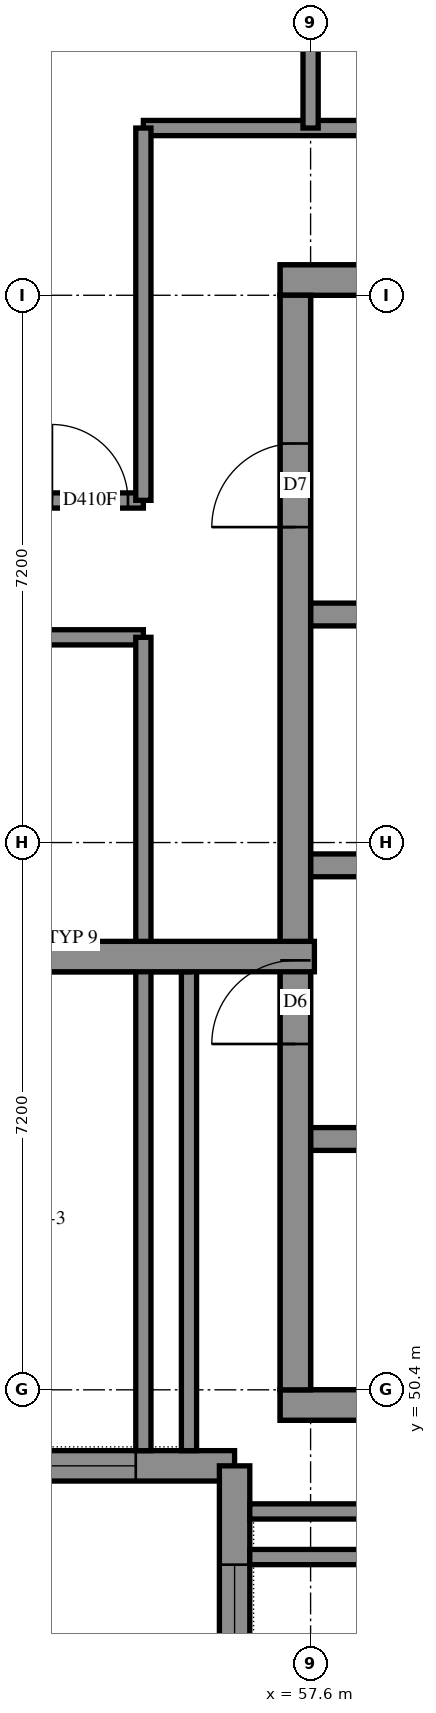
"""IFC4 building model, lengths in metres.
Left out: names, types, materials, properties, quantities, classifications, styles, units other than length and angle.
Written with IfcOpenShell. Run it as: python <this file> out.ifc"""

import sys

from ifc_helpers import new_model, si_unit, direction, frame, frame_2d, origin, place, context, subcontext, project, spatial, polyline, rectangle, outline, extrude, element, fill, save


model = new_model("IFC4")
c1 = context("Model", 3, precision=1e-05, world=origin(), true_north=direction((0.0, 1.0)))
c2 = subcontext(c1, "Body", "Model", "MODEL_VIEW")
j1 = project(units=[si_unit("LENGTHUNIT", "METRE"), si_unit("PLANEANGLEUNIT", "RADIAN")], contexts=[c1])
p1 = place(None, origin())
s1 = spatial("IfcSite", under=j1, at=p1, CompositionType="ELEMENT")
p2 = place(p1, origin())
s2 = spatial("IfcBuilding", under=s1, at=p2, CompositionType="ELEMENT")
p3 = place(p2, frame((0.0, 0.0, 290.6)))
s3 = spatial("IfcBuildingStorey", under=s2, at=p3, CompositionType="ELEMENT", Elevation=290.6)
p4 = place(p3, frame((57.2, 50.2, -0.3), z_axis=(0.0, 0.0, 1.0), x_axis=(1.0, 0.0, 0.0)))
e1 = element("IfcWall", 1, at=p4, inside=s3, PredefinedType="SHEAR", context=c2, shape_type="SweptSolid", body=[
    extrude(rectangle(XDim=15.2, YDim=0.4, at=frame_2d((7.6, 0.0))), origin(), (0.0, 0.0, 1.0), 3.1),
])
p5 = place(p3, frame((57.2, 65.0, -0.3), z_axis=(0.0, 0.0, 1.0), x_axis=(1.0, 0.0, 0.0)))
e2 = element("IfcWall", 2, at=p5, inside=s3, PredefinedType="SHEAR", context=c2, shape_type="SweptSolid", body=[
    extrude(rectangle(XDim=15.2, YDim=0.4, at=frame_2d((7.6, 0.0))), origin(), (0.0, 0.0, 1.0), 3.1),
])
p6 = place(p5, frame((10.4, 0.0, 0.3)))
e3 = element("IfcOpeningElement", 3, at=p6, cuts=e2, PredefinedType="OPENING", context=c2, shape_type="SweptSolid", body=[
    extrude(rectangle(XDim=0.8, YDim=2.1, at=frame_2d((0.4, 1.05))), frame((0.0, 0.21, 0.0), z_axis=(0.0, -1.0, 0.0), x_axis=(1.0, 0.0, 0.0)), (0.0, 0.0, 1.0), 0.42),
])
p7 = place(p3, frame((57.4, 50.4, -0.3), z_axis=(0.0, 0.0, 1.0), x_axis=(0.0, 1.0, 0.0)))
e4 = element("IfcWall", 4, at=p7, inside=s3, PredefinedType="SHEAR", context=c2, shape_type="SweptSolid", body=[
    extrude(rectangle(XDim=14.4, YDim=0.4, at=frame_2d((7.2, 0.0))), origin(), (0.0, 0.0, 1.0), 3.1),
])
p8 = place(p7, frame((4.55, 0.0, 0.3)))
e5 = element("IfcOpeningElement", 5, at=p8, cuts=e4, PredefinedType="OPENING", context=c2, shape_type="SweptSolid", body=[
    extrude(rectangle(XDim=1.1, YDim=2.1, at=frame_2d((0.55, 1.05))), frame((0.0, 0.21, 0.0), z_axis=(0.0, -1.0, 0.0), x_axis=(1.0, 0.0, 0.0)), (0.0, 0.0, 1.0), 0.42),
])
p9 = place(p7, frame((11.35, 0.0, 0.3)))
e6 = element("IfcOpeningElement", 6, at=p9, cuts=e4, PredefinedType="OPENING", context=c2, shape_type="SweptSolid", body=[
    extrude(rectangle(XDim=1.1, YDim=2.1, at=frame_2d((0.55, 1.05))), frame((0.0, 0.21, 0.0), z_axis=(0.0, -1.0, 0.0), x_axis=(1.0, 0.0, 0.0)), (0.0, 0.0, 1.0), 0.42),
])
p10 = place(p3, frame((57.6, 53.7, 0.0), z_axis=(0.0, 0.0, 1.0), x_axis=(1.0, 0.0, 0.0)))
e7 = element("IfcWall", 7, at=p10, inside=s3, PredefinedType="SOLIDWALL", context=c2, shape_type="SweptSolid", body=[
    extrude(rectangle(XDim=14.4, YDim=0.3, at=frame_2d((7.2, 0.0))), origin(), (0.0, 0.0, 1.0), 3.5),
])
p11 = place(p10, frame((12.05, 0.0, 0.0)))
e8 = element("IfcOpeningElement", 8, at=p11, cuts=e7, PredefinedType="OPENING", context=c2, shape_type="SweptSolid", body=[
    extrude(rectangle(XDim=1.1, YDim=2.1, at=frame_2d((0.55, 1.05))), frame((0.0, 0.16, 0.0), z_axis=(0.0, -1.0, 0.0), x_axis=(1.0, 0.0, 0.0)), (0.0, 0.0, 1.0), 0.32),
])
p12 = place(p3, frame((57.6, 57.3, 0.0), z_axis=(0.0, 0.0, 1.0), x_axis=(1.0, 0.0, 0.0)))
e9 = element("IfcWall", 9, at=p12, inside=s3, PredefinedType="SOLIDWALL", context=c2, shape_type="SweptSolid", body=[
    extrude(rectangle(XDim=14.4, YDim=0.3, at=frame_2d((7.2, 0.0))), origin(), (0.0, 0.0, 1.0), 3.5),
])
p13 = place(p12, frame((12.05, 0.0, 0.0)))
e10 = element("IfcOpeningElement", 10, at=p13, cuts=e9, PredefinedType="OPENING", context=c2, shape_type="SweptSolid", body=[
    extrude(rectangle(XDim=1.1, YDim=2.1, at=frame_2d((0.55, 1.05))), frame((0.0, 0.16, 0.0), z_axis=(0.0, -1.0, 0.0), x_axis=(1.0, 0.0, 0.0)), (0.0, 0.0, 1.0), 0.32),
])
p14 = place(p3, frame((57.6, 60.6, 0.0), z_axis=(0.0, 0.0, 1.0), x_axis=(1.0, 0.0, 0.0)))
e11 = element("IfcWall", 11, at=p14, inside=s3, PredefinedType="SOLIDWALL", context=c2, shape_type="SweptSolid", body=[
    extrude(rectangle(XDim=7.2, YDim=0.3, at=frame_2d((3.6, 0.0))), origin(), (0.0, 0.0, 1.0), 3.5),
])
p15 = place(p3, frame((49.4, 49.4, 0.0), z_axis=(0.0, 0.0, 1.0), x_axis=(1.0, 0.0, 0.0)))
e12 = element("IfcWall", 12, at=p15, inside=s3, PredefinedType="SOLIDWALL", context=c2, shape_type="SweptSolid", body=[
    extrude(outline(polyline([(-0.2, -0.2), (7.0, -0.2), (7.4, 0.2), (0.2, 0.2), (-0.2, -0.2)])), origin(), (0.0, 0.0, 1.0), 3.5),
])
p16 = place(p15, frame((1.9, 0.0, 0.7)))
e13 = element("IfcOpeningElement", 13, at=p16, cuts=e12, PredefinedType="OPENING", context=c2, shape_type="SweptSolid", body=[
    extrude(rectangle(XDim=1.8, YDim=2.2, at=frame_2d((0.9, 1.1))), frame((0.0, 0.21, 0.0), z_axis=(0.0, -1.0, 0.0), x_axis=(1.0, 0.0, 0.0)), (0.0, 0.0, 1.0), 0.42),
])
p17 = place(p15, frame((4.1, 0.0, 0.7)))
e14 = element("IfcOpeningElement", 14, at=p17, cuts=e12, PredefinedType="OPENING", context=c2, shape_type="SweptSolid", body=[
    extrude(rectangle(XDim=1.8, YDim=2.2, at=frame_2d((0.9, 1.1))), frame((0.0, 0.21, 0.0), z_axis=(0.0, -1.0, 0.0), x_axis=(1.0, 0.0, 0.0)), (0.0, 0.0, 1.0), 0.42),
])
p18 = place(p3, frame((56.6, 49.4, 0.0), z_axis=(0.0, 0.0, 1.0), x_axis=(0.0, -1.0, 0.0)))
e15 = element("IfcWall", 15, at=p18, inside=s3, PredefinedType="SOLIDWALL", context=c2, shape_type="SweptSolid", body=[
    extrude(outline(polyline([(0.2, -0.2), (8.633, -0.2), (8.075, 0.2), (-0.2, 0.2), (0.2, -0.2)])), origin(), (0.0, 0.0, 1.0), 3.5),
])
p19 = place(p18, frame((1.3, 0.0, 0.7)))
e16 = element("IfcOpeningElement", 16, at=p19, cuts=e15, PredefinedType="OPENING", context=c2, shape_type="SweptSolid", body=[
    extrude(rectangle(XDim=1.8, YDim=2.2, at=frame_2d((0.9, 1.1))), frame((0.0, 0.21, 0.0), z_axis=(0.0, -1.0, 0.0), x_axis=(1.0, 0.0, 0.0)), (0.0, 0.0, 1.0), 0.42),
])
p20 = place(p18, frame((3.9, 0.0, 0.7)))
e17 = element("IfcOpeningElement", 17, at=p20, cuts=e15, PredefinedType="OPENING", context=c2, shape_type="SweptSolid", body=[
    extrude(rectangle(XDim=1.8, YDim=2.2, at=frame_2d((0.9, 1.1))), frame((0.0, 0.21, 0.0), z_axis=(0.0, -1.0, 0.0), x_axis=(1.0, 0.0, 0.0)), (0.0, 0.0, 1.0), 0.42),
])
p21 = place(p3, frame((56.0, 49.6, 0.0), z_axis=(0.0, 0.0, 1.0), x_axis=(0.0, 1.0, 0.0)))
e18 = element("IfcWall", 18, at=p21, inside=s3, PredefinedType="PARAPET", context=c2, shape_type="SweptSolid", body=[
    extrude(outline(polyline([(0.0, -0.1), (6.5, -0.1), (6.3, 0.1), (0.0, 0.1), (0.0, -0.1)])), origin(), (0.0, 0.0, 1.0), 0.25),
])
p22 = place(p3, frame((56.0, 56.0, 0.0), z_axis=(0.0, 0.0, 1.0), x_axis=(-1.0, 0.0, 0.0)))
e19 = element("IfcWall", 19, at=p22, inside=s3, PredefinedType="PARAPET", context=c2, shape_type="SweptSolid", body=[
    extrude(outline(polyline([(-0.1, -0.1), (6.4, -0.1), (6.4, 0.1), (0.1, 0.1), (-0.1, -0.1)])), origin(), (0.0, 0.0, 1.0), 0.25),
])
p23 = place(p3, frame((55.4, 67.0, 0.0), z_axis=(0.0, 0.0, 1.0), x_axis=(1.0, 0.0, 0.0)))
e20 = element("IfcWall", 20, at=p23, inside=s3, PredefinedType="PARTITIONING", context=c2, shape_type="SweptSolid", body=[
    extrude(rectangle(XDim=18.8, YDim=0.2, at=frame_2d((9.4, 0.0))), origin(), (0.0, 0.0, 1.0), 3.5),
])
p24 = place(p23, frame((4.293, 0.0, 0.0)))
e21 = element("IfcOpeningElement", 21, at=p24, cuts=e20, PredefinedType="OPENING", context=c2, shape_type="SweptSolid", body=[
    extrude(rectangle(XDim=1.0, YDim=2.1, at=frame_2d((0.5, 1.05))), frame((0.0, 0.11, 0.0), z_axis=(0.0, -1.0, 0.0), x_axis=(1.0, 0.0, 0.0)), (0.0, 0.0, 1.0), 0.22),
])
p25 = place(p23, frame((6.367, 0.0, 0.0)))
e22 = element("IfcOpeningElement", 22, at=p25, cuts=e20, PredefinedType="OPENING", context=c2, shape_type="SweptSolid", body=[
    extrude(rectangle(XDim=1.0, YDim=2.1, at=frame_2d((0.5, 1.05))), frame((0.0, 0.11, 0.0), z_axis=(0.0, -1.0, 0.0), x_axis=(1.0, 0.0, 0.0)), (0.0, 0.0, 1.0), 0.22),
])
p26 = place(p23, frame((11.492, 0.0, 0.0)))
e23 = element("IfcOpeningElement", 23, at=p26, cuts=e20, PredefinedType="OPENING", context=c2, shape_type="SweptSolid", body=[
    extrude(rectangle(XDim=1.0, YDim=2.1, at=frame_2d((0.5, 1.05))), frame((0.0, 0.11, 0.0), z_axis=(0.0, -1.0, 0.0), x_axis=(1.0, 0.0, 0.0)), (0.0, 0.0, 1.0), 0.22),
])
p27 = place(p23, frame((13.568, 0.0, 0.0)))
e24 = element("IfcOpeningElement", 24, at=p27, cuts=e20, PredefinedType="OPENING", context=c2, shape_type="SweptSolid", body=[
    extrude(rectangle(XDim=1.0, YDim=2.1, at=frame_2d((0.5, 1.05))), frame((0.0, 0.11, 0.0), z_axis=(0.0, -1.0, 0.0), x_axis=(1.0, 0.0, 0.0)), (0.0, 0.0, 1.0), 0.22),
])
p28 = place(p3, frame((56.8, 48.2, 0.0), z_axis=(0.0, 0.0, 1.0), x_axis=(1.0, 0.0, 0.0)))
e25 = element("IfcWall", 25, at=p28, inside=s3, PredefinedType="PARTITIONING", context=c2, shape_type="SweptSolid", body=[
    extrude(rectangle(XDim=17.632, YDim=0.2, at=frame_2d((8.816, 0.0))), origin(), (0.0, 0.0, 1.0), 3.5),
])
p29 = place(p28, frame((4.081, 0.0, 0.0)))
e26 = element("IfcOpeningElement", 26, at=p29, cuts=e25, PredefinedType="OPENING", context=c2, shape_type="SweptSolid", body=[
    extrude(rectangle(XDim=1.0, YDim=2.1, at=frame_2d((0.5, 1.05))), frame((0.0, 0.11, 0.0), z_axis=(0.0, -1.0, 0.0), x_axis=(1.0, 0.0, 0.0)), (0.0, 0.0, 1.0), 0.22),
])
p30 = place(p28, frame((11.886, 0.0, 0.0)))
e27 = element("IfcOpeningElement", 27, at=p30, cuts=e25, PredefinedType="OPENING", context=c2, shape_type="SweptSolid", body=[
    extrude(rectangle(XDim=1.0, YDim=2.1, at=frame_2d((0.5, 1.05))), frame((0.0, 0.11, 0.0), z_axis=(0.0, -1.0, 0.0), x_axis=(1.0, 0.0, 0.0)), (0.0, 0.0, 1.0), 0.22),
])
p31 = place(p3, frame((43.2, 60.3, 0.0), z_axis=(0.0, 0.0, 1.0), x_axis=(1.0, 0.0, 0.0)))
e28 = element("IfcWall", 28, at=p31, inside=s3, PredefinedType="PARTITIONING", context=c2, shape_type="SweptSolid", body=[
    extrude(rectangle(XDim=12.2, YDim=0.2, at=frame_2d((6.1, 0.0))), origin(), (0.0, 0.0, 1.0), 3.5),
])
p32 = place(p31, frame((2.033, 0.0, 0.0)))
e29 = element("IfcOpeningElement", 29, at=p32, cuts=e28, PredefinedType="OPENING", context=c2, shape_type="SweptSolid", body=[
    extrude(rectangle(XDim=1.0, YDim=2.1, at=frame_2d((0.5, 1.05))), frame((0.0, 0.11, 0.0), z_axis=(0.0, -1.0, 0.0), x_axis=(1.0, 0.0, 0.0)), (0.0, 0.0, 1.0), 0.22),
])
p33 = place(p31, frame((4.107, 0.0, 0.0)))
e30 = element("IfcOpeningElement", 30, at=p33, cuts=e28, PredefinedType="OPENING", context=c2, shape_type="SweptSolid", body=[
    extrude(rectangle(XDim=1.0, YDim=2.1, at=frame_2d((0.5, 1.05))), frame((0.0, 0.11, 0.0), z_axis=(0.0, -1.0, 0.0), x_axis=(1.0, 0.0, 0.0)), (0.0, 0.0, 1.0), 0.22),
])
p34 = place(p31, frame((9.965, 0.0, 0.0)))
e31 = element("IfcOpeningElement", 31, at=p34, cuts=e28, PredefinedType="OPENING", context=c2, shape_type="SweptSolid", body=[
    extrude(rectangle(XDim=1.0, YDim=2.1, at=frame_2d((0.5, 1.05))), frame((0.0, 0.11, 0.0), z_axis=(0.0, -1.0, 0.0), x_axis=(1.0, 0.0, 0.0)), (0.0, 0.0, 1.0), 0.22),
])
p35 = place(p3, frame((55.4, 49.6, 0.0), z_axis=(0.0, 0.0, 1.0), x_axis=(0.0, 1.0, 0.0)))
e32 = element("IfcWall", 32, at=p35, inside=s3, PredefinedType="PARTITIONING", context=c2, shape_type="SweptSolid", body=[
    extrude(rectangle(XDim=10.7, YDim=0.2, at=frame_2d((5.35, 0.0))), origin(), (0.0, 0.0, 1.0), 3.5),
])
p36 = place(p3, frame((47.702, 62.1, 0.0), z_axis=(0.0, 0.0, 1.0), x_axis=(1.0, 0.0, 0.0)))
e33 = element("IfcWall", 33, at=p36, inside=s3, PredefinedType="PARTITIONING", context=c2, shape_type="SweptSolid", body=[
    extrude(rectangle(XDim=7.698, YDim=0.2, at=frame_2d((3.849, 0.0))), origin(), (0.0, 0.0, 1.0), 3.5),
])
p37 = place(p36, frame((0.265, 0.0, 0.0)))
e34 = element("IfcOpeningElement", 34, at=p37, cuts=e33, PredefinedType="OPENING", context=c2, shape_type="SweptSolid", body=[
    extrude(rectangle(XDim=1.0, YDim=2.1, at=frame_2d((0.5, 1.05))), frame((0.0, 0.11, 0.0), z_axis=(0.0, -1.0, 0.0), x_axis=(1.0, 0.0, 0.0)), (0.0, 0.0, 1.0), 0.22),
])
p38 = place(p36, frame((4.79, 0.0, 0.0)))
e35 = element("IfcOpeningElement", 35, at=p38, cuts=e33, PredefinedType="OPENING", context=c2, shape_type="SweptSolid", body=[
    extrude(rectangle(XDim=1.0, YDim=2.1, at=frame_2d((0.5, 1.05))), frame((0.0, 0.11, 0.0), z_axis=(0.0, -1.0, 0.0), x_axis=(1.0, 0.0, 0.0)), (0.0, 0.0, 1.0), 0.22),
])
p39 = place(p36, frame((6.495, 0.0, 0.0)))
e36 = element("IfcOpeningElement", 36, at=p39, cuts=e33, PredefinedType="OPENING", context=c2, shape_type="SweptSolid", body=[
    extrude(rectangle(XDim=1.0, YDim=2.1, at=frame_2d((0.5, 1.05))), frame((0.0, 0.11, 0.0), z_axis=(0.0, -1.0, 0.0), x_axis=(1.0, 0.0, 0.0)), (0.0, 0.0, 1.0), 0.22),
])
p40 = place(p3, frame((55.4, 62.102, 0.0), z_axis=(0.0, 0.0, 1.0), x_axis=(0.0, 1.0, 0.0)))
e37 = element("IfcWall", 37, at=p40, inside=s3, PredefinedType="PARTITIONING", context=c2, shape_type="SweptSolid", body=[
    extrude(rectangle(XDim=4.898, YDim=0.2, at=frame_2d((2.449, 0.0))), origin(), (0.0, 0.0, 1.0), 3.5),
])
p41 = place(p3, frame((57.6, 67.0, 0.0), z_axis=(0.0, 0.0, 1.0), x_axis=(0.0, 1.0, 0.0)))
e38 = element("IfcWall", 38, at=p41, inside=s3, PredefinedType="PARTITIONING", context=c2, shape_type="SweptSolid", body=[
    extrude(rectangle(XDim=5.35, YDim=0.2, at=frame_2d((2.675, 0.0))), origin(), (0.0, 0.0, 1.0), 3.5),
])
p42 = place(p3, frame((60.611, 48.8, 0.0), z_axis=(0.0, 0.0, 1.0), x_axis=(-1.0, 0.0, 0.0)))
e39 = element("IfcWall", 39, at=p42, inside=s3, PredefinedType="PARAPET", context=c2, shape_type="SweptSolid", body=[
    extrude(outline(polyline([(0.0, -0.1), (3.811, -0.1), (3.811, 0.1), (0.0, 0.1), (0.0, -0.1)])), origin(), (0.0, 0.0, 1.0), 0.25),
])
p43 = place(p17, origin())
e40 = element("IfcWindow", 40, at=p43, inside=s3, PartitioningType="SINGLE_PANEL", PredefinedType="WINDOW", context=c2, shape_type="SweptSolid", body=[
    extrude(rectangle(XDim=1.8, YDim=2.2, at=frame_2d((0.9, 1.1))), frame((0.0, 0.08, 0.0), z_axis=(0.0, -1.0, 0.0), x_axis=(1.0, 0.0, 0.0)), (0.0, 0.0, 1.0), 0.06),
])
fill(e14, e40)
p44 = place(p19, origin())
e41 = element("IfcWindow", 41, at=p44, inside=s3, PartitioningType="SINGLE_PANEL", PredefinedType="WINDOW", context=c2, shape_type="SweptSolid", body=[
    extrude(rectangle(XDim=1.8, YDim=2.2, at=frame_2d((0.9, 1.1))), frame((0.0, 0.08, 0.0), z_axis=(0.0, -1.0, 0.0), x_axis=(1.0, 0.0, 0.0)), (0.0, 0.0, 1.0), 0.06),
])
fill(e16, e41)
p45 = place(p8, origin())
e42 = element("IfcDoor", 42, at=p45, inside=s3, OperationType="DOUBLE_DOOR_SINGLE_SWING", PredefinedType="DOOR", context=c2, shape_type="SweptSolid", body=[
    extrude(rectangle(XDim=1.1, YDim=2.1, at=frame_2d((0.55, 1.05))), frame((0.0, 0.025, 0.0), z_axis=(0.0, -1.0, 0.0), x_axis=(1.0, 0.0, 0.0)), (0.0, 0.0, 1.0), 0.05),
])
fill(e5, e42)
p46 = place(p9, origin())
e43 = element("IfcDoor", 43, at=p46, inside=s3, OperationType="SINGLE_SWING_LEFT", PredefinedType="DOOR", context=c2, shape_type="SweptSolid", body=[
    extrude(rectangle(XDim=1.1, YDim=2.1, at=frame_2d((0.55, 1.05))), frame((0.0, 0.025, 0.0), z_axis=(0.0, -1.0, 0.0), x_axis=(1.0, 0.0, 0.0)), (0.0, 0.0, 1.0), 0.05),
])
fill(e6, e43)
p47 = place(p39, origin())
e44 = element("IfcDoor", 44, at=p47, inside=s3, OperationType="SINGLE_SWING_LEFT", PredefinedType="DOOR", context=c2, shape_type="SweptSolid", body=[
    extrude(rectangle(XDim=1.0, YDim=2.1, at=frame_2d((0.5, 1.05))), frame((0.0, 0.025, 0.0), z_axis=(0.0, -1.0, 0.0), x_axis=(1.0, 0.0, 0.0)), (0.0, 0.0, 1.0), 0.05),
])
fill(e36, e44)
save(model, sys.argv[1])
